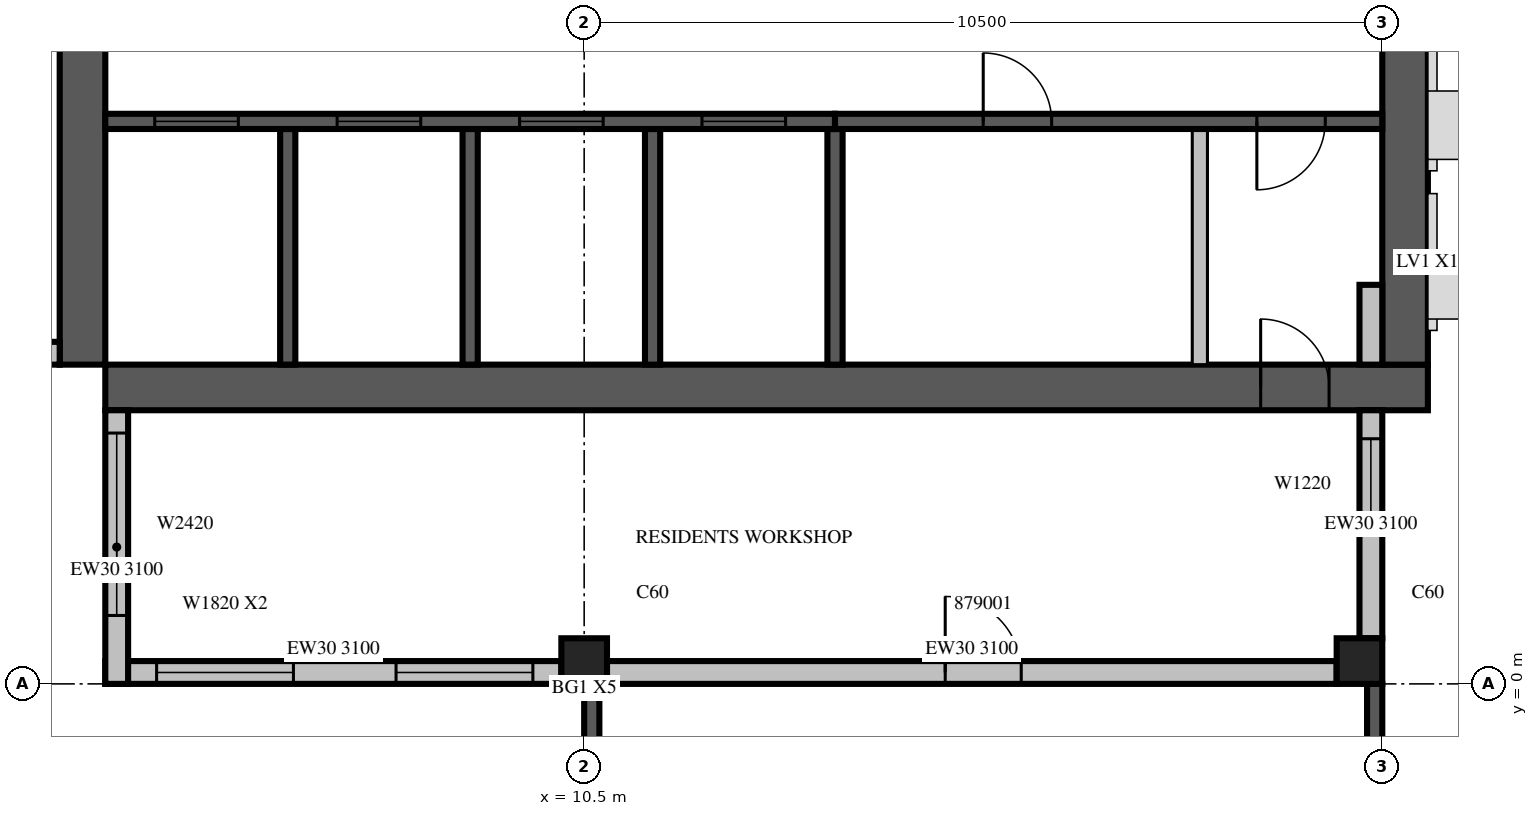
"""IFC4 building model, lengths in metres.
Left out: names, types, materials, properties, quantities, classifications, styles, units other than length and angle.
Written with IfcOpenShell. Run it as: python <this file> out.ifc"""

import sys

from ifc_helpers import new_model, si_unit, direction, frame, frame_2d, origin, origin_2d, place, context, subcontext, project, spatial, rectangle, extrude, source, transform, mapped, element, fill, save


model = new_model("IFC4")
c1 = context("Model", 3, precision=1e-05, world=origin(), true_north=direction((0.0, 1.0)))
c2 = subcontext(c1, "Body", "Model", "MODEL_VIEW")
j1 = project(units=[si_unit("LENGTHUNIT", "METRE"), si_unit("PLANEANGLEUNIT", "RADIAN")], contexts=[c1])
p1 = place(None, origin())
s1 = spatial("IfcSite", under=j1, at=p1, CompositionType="ELEMENT")
p2 = place(p1, origin())
s2 = spatial("IfcBuilding", under=s1, at=p2, CompositionType="ELEMENT")
p3 = place(p2, frame((0.0, 0.0, 337.0)))
s3 = spatial("IfcBuildingStorey", under=s2, at=p3, CompositionType="ELEMENT", Elevation=337.0)
m1 = source(origin(), c2, "Body", "SweptSolid", [
    extrude(rectangle(XDim=0.6, YDim=0.6, at=origin_2d()), origin(), (0.0, 0.0, 1.0), 3.5),
])
for number, where, z_axis, x_axis in (
    (1, (10.5, 0.3, 0.0), (0.0, 0.0, 1.0), (1.0, 0.0, 0.0)),
    (2, (20.7, 0.3, 0.0), (0.0, 0.0, 1.0), (1.0, 0.0, 0.0)),
):
    element("IfcColumn", number, at=place(p3, frame(where, z_axis=z_axis, x_axis=x_axis)), inside=s3, PredefinedType="COLUMN", context=c2, shape_type="MappedRepresentation", body=[
        mapped(m1, transform((0.0, 0.0, 0.0), scale=1.0)),
    ])
m2 = source(origin(), c2, "Body", "SweptSolid", [
    extrude(rectangle(XDim=17.4, YDim=0.6, at=frame_2d((8.7, 0.0))), origin(), (0.0, 0.0, 1.0), 3.5),
])
p4 = place(p3, frame((3.9, 4.2, 0.0), z_axis=(0.0, 0.0, 1.0), x_axis=(0.0, 1.0, 0.0)))
e3 = element("IfcWall", 3, at=p4, inside=s3, PredefinedType="SHEAR", context=c2, shape_type="MappedRepresentation", body=[
    mapped(m2, transform((0.0, 0.0, 0.0), scale=1.0)),
])
m3 = source(origin(), c2, "Body", "SweptSolid", [
    extrude(rectangle(XDim=2.2, YDim=2.1, at=frame_2d((1.1, 1.05))), frame((0.0, 0.31, 0.0), z_axis=(0.0, -1.0, 0.0), x_axis=(1.0, 0.0, 0.0)), (0.0, 0.0, 1.0), 0.62),
])
p5 = place(p4, frame((4.2, 0.0, 0.0)))
e4 = element("IfcOpeningElement", 4, at=p5, cuts=e3, PredefinedType="OPENING", context=c2, shape_type="MappedRepresentation", body=[
    mapped(m3, transform((0.0, 0.0, 0.0), scale=1.0)),
])
p6 = place(p3, frame((4.2, 3.9, 0.0), z_axis=(0.0, 0.0, 1.0), x_axis=(1.0, 0.0, 0.0)))
e5 = element("IfcWall", 5, at=p6, inside=s3, PredefinedType="SHEAR", context=c2, shape_type="MappedRepresentation", body=[
    mapped(m2, transform((0.0, 0.0, 0.0), scale=1.0)),
])
m4 = source(origin(), c2, "Body", "SweptSolid", [
    extrude(rectangle(XDim=0.9, YDim=2.1, at=frame_2d((0.45, 1.05))), frame((0.0, 0.31, 0.0), z_axis=(0.0, -1.0, 0.0), x_axis=(1.0, 0.0, 0.0)), (0.0, 0.0, 1.0), 0.62),
])
p7 = place(p6, frame((15.2, 0.0, 0.0)))
e6 = element("IfcOpeningElement", 6, at=p7, cuts=e5, PredefinedType="OPENING", context=c2, shape_type="MappedRepresentation", body=[
    mapped(m4, transform((0.0, 0.0, 0.0), scale=1.0)),
])
m5 = source(origin(), c2, "Body", "SweptSolid", [
    extrude(rectangle(XDim=16.8, YDim=0.6, at=frame_2d((8.4, 0.0))), origin(), (0.0, 0.0, 1.0), 3.5),
])
p8 = place(p3, frame((21.3, 4.2, 0.0), z_axis=(0.0, 0.0, 1.0), x_axis=(0.0, 1.0, 0.0)))
e7 = element("IfcWall", 7, at=p8, inside=s3, PredefinedType="SHEAR", context=c2, shape_type="MappedRepresentation", body=[
    mapped(m5, transform((0.0, 0.0, 0.0), scale=1.0)),
])
m6 = source(origin(), c2, "Body", "SweptSolid", [
    extrude(rectangle(XDim=1.2, YDim=2.4, at=frame_2d((0.6, 1.2))), frame((0.0, 0.31, 0.0), z_axis=(0.0, -1.0, 0.0), x_axis=(1.0, 0.0, 0.0)), (0.0, 0.0, 1.0), 0.62),
])
p9 = place(p8, frame((12.0, 0.0, 0.6)))
e8 = element("IfcOpeningElement", 8, at=p9, cuts=e7, PredefinedType="OPENING", context=c2, shape_type="MappedRepresentation", body=[
    mapped(m6, transform((0.0, 0.0, 0.0), scale=1.0)),
])
m7 = source(origin(), c2, "Body", "SweptSolid", [
    extrude(rectangle(XDim=3.9, YDim=0.2, at=frame_2d((1.95, 0.0))), origin(), (0.0, 0.0, 1.0), 3.1),
])
p10 = place(p3, frame((10.6, 0.0, 0.0), z_axis=(0.0, 0.0, 1.0), x_axis=(0.0, -1.0, 0.0)))
e9 = element("IfcWall", 9, at=p10, inside=s3, PredefinedType="SOLIDWALL", context=c2, shape_type="MappedRepresentation", body=[
    mapped(m7, transform((0.0, 0.0, 0.0), scale=1.0)),
])
m8 = source(origin(), c2, "Body", "SweptSolid", [
    extrude(rectangle(XDim=2.4, YDim=2.0, at=frame_2d((1.2, 1.0))), frame((0.0, 0.11, 0.0), z_axis=(0.0, -1.0, 0.0), x_axis=(1.0, 0.0, 0.0)), (0.0, 0.0, 1.0), 0.22),
])
p11 = place(p10, frame((0.75, 0.0, 0.6)))
e10 = element("IfcOpeningElement", 10, at=p11, cuts=e9, PredefinedType="OPENING", context=c2, shape_type="MappedRepresentation", body=[
    mapped(m8, transform((0.0, 0.0, 0.0), scale=1.0)),
])
p12 = place(p3, frame((20.9, 0.0, 0.0), z_axis=(0.0, 0.0, 1.0), x_axis=(0.0, -1.0, 0.0)))
e11 = element("IfcWall", 11, at=p12, inside=s3, PredefinedType="SOLIDWALL", context=c2, shape_type="MappedRepresentation", body=[
    mapped(m7, transform((0.0, 0.0, 0.0), scale=1.0)),
])
p13 = place(p12, frame((0.75, 0.0, 0.6)))
e12 = element("IfcOpeningElement", 12, at=p13, cuts=e11, PredefinedType="OPENING", context=c2, shape_type="MappedRepresentation", body=[
    mapped(m8, transform((0.0, 0.0, 0.0), scale=1.0)),
])
m9 = source(origin(), c2, "Body", "SweptSolid", [
    extrude(rectangle(XDim=6.0, YDim=0.3, at=frame_2d((3.0, 0.0))), origin(), (0.0, 0.0, 1.0), 3.1),
])
p14 = place(p3, frame((4.2, 0.15, 0.0), z_axis=(0.0, 0.0, 1.0), x_axis=(1.0, 0.0, 0.0)))
e13 = element("IfcWall", 13, at=p14, inside=s3, PredefinedType="STANDARD", context=c2, shape_type="MappedRepresentation", body=[
    mapped(m9, transform((0.0, 0.0, 0.0), scale=1.0)),
])
m10 = source(origin(), c2, "Body", "SweptSolid", [
    extrude(rectangle(XDim=1.8, YDim=2.0, at=frame_2d((0.9, 1.0))), frame((0.0, 0.16, 0.0), z_axis=(0.0, -1.0, 0.0), x_axis=(1.0, 0.0, 0.0)), (0.0, 0.0, 1.0), 0.32),
])
p15 = place(p14, frame((0.675, 0.0, 0.6)))
e14 = element("IfcOpeningElement", 14, at=p15, cuts=e13, PredefinedType="OPENING", context=c2, shape_type="MappedRepresentation", body=[
    mapped(m10, transform((0.0, 0.0, 0.0), scale=1.0)),
])
p16 = place(p14, frame((3.825, 0.0, 0.6)))
e15 = element("IfcOpeningElement", 15, at=p16, cuts=e13, PredefinedType="OPENING", context=c2, shape_type="MappedRepresentation", body=[
    mapped(m10, transform((0.0, 0.0, 0.0), scale=1.0)),
])
m11 = source(origin(), c2, "Body", "SweptSolid", [
    extrude(rectangle(XDim=9.6, YDim=0.3, at=frame_2d((4.8, 0.0))), origin(), (0.0, 0.0, 1.0), 3.1),
])
p17 = place(p3, frame((10.8, 0.15, 0.0), z_axis=(0.0, 0.0, 1.0), x_axis=(1.0, 0.0, 0.0)))
e16 = element("IfcWall", 16, at=p17, inside=s3, PredefinedType="STANDARD", context=c2, shape_type="MappedRepresentation", body=[
    mapped(m11, transform((0.0, 0.0, 0.0), scale=1.0)),
])
m12 = source(origin(), c2, "Body", "SweptSolid", [
    extrude(rectangle(XDim=1.0, YDim=2.1, at=frame_2d((0.5, 1.05))), frame((0.0, 0.16, 0.0), z_axis=(0.0, -1.0, 0.0), x_axis=(1.0, 0.0, 0.0)), (0.0, 0.0, 1.0), 0.32),
])
p18 = place(p17, frame((4.45, 0.0, 0.0)))
e17 = element("IfcOpeningElement", 17, at=p18, cuts=e16, PredefinedType="OPENING", context=c2, shape_type="MappedRepresentation", body=[
    mapped(m12, transform((0.0, 0.0, 0.0), scale=1.0)),
])
m13 = source(origin(), c2, "Body", "SweptSolid", [
    extrude(rectangle(XDim=3.0, YDim=0.3, at=frame_2d((1.5, 0.0))), origin(), (0.0, 0.0, 1.0), 3.1),
])
p19 = place(p3, frame((20.85, 0.6, 0.0), z_axis=(0.0, 0.0, 1.0), x_axis=(0.0, 1.0, 0.0)))
e18 = element("IfcWall", 18, at=p19, inside=s3, PredefinedType="STANDARD", context=c2, shape_type="MappedRepresentation", body=[
    mapped(m13, transform((0.0, 0.0, 0.0), scale=1.0)),
])
m14 = source(origin(), c2, "Body", "SweptSolid", [
    extrude(rectangle(XDim=1.2, YDim=2.0, at=frame_2d((0.6, 1.0))), frame((0.0, 0.16, 0.0), z_axis=(0.0, -1.0, 0.0), x_axis=(1.0, 0.0, 0.0)), (0.0, 0.0, 1.0), 0.32),
])
p20 = place(p19, frame((1.425, 0.0, 0.6)))
e19 = element("IfcOpeningElement", 19, at=p20, cuts=e18, PredefinedType="OPENING", context=c2, shape_type="MappedRepresentation", body=[
    mapped(m14, transform((0.0, 0.0, 0.0), scale=1.0)),
])
m15 = source(origin(), c2, "Body", "SweptSolid", [
    extrude(rectangle(XDim=1.05, YDim=0.3, at=frame_2d((0.525, 0.0))), origin(), (0.0, 0.0, 1.0), 3.1),
])
p21 = place(p3, frame((20.85, 4.2, 0.0), z_axis=(0.0, 0.0, 1.0), x_axis=(0.0, 1.0, 0.0)))
e20 = element("IfcWall", 20, at=p21, inside=s3, PredefinedType="STANDARD", context=c2, shape_type="MappedRepresentation", body=[
    mapped(m15, transform((0.0, 0.0, 0.0), scale=1.0)),
])
m16 = source(origin(), c2, "Body", "SweptSolid", [
    extrude(rectangle(XDim=3.6, YDim=0.3, at=frame_2d((1.8, 0.0))), origin(), (0.0, 0.0, 1.0), 3.1),
])
p22 = place(p3, frame((0.0, 4.35, 0.0), z_axis=(0.0, 0.0, 1.0), x_axis=(1.0, 0.0, 0.0)))
e21 = element("IfcWall", 21, at=p22, inside=s3, PredefinedType="STANDARD", context=c2, shape_type="MappedRepresentation", body=[
    mapped(m16, transform((0.0, 0.0, 0.0), scale=1.0)),
])
m17 = source(origin(), c2, "Body", "SweptSolid", [
    extrude(rectangle(XDim=2.4, YDim=2.0, at=frame_2d((1.2, 1.0))), frame((0.0, 0.16, 0.0), z_axis=(0.0, -1.0, 0.0), x_axis=(1.0, 0.0, 0.0)), (0.0, 0.0, 1.0), 0.32),
])
p23 = place(p22, frame((0.9, 0.0, 0.6)))
e22 = element("IfcOpeningElement", 22, at=p23, cuts=e21, PredefinedType="OPENING", context=c2, shape_type="MappedRepresentation", body=[
    mapped(m17, transform((0.0, 0.0, 0.0), scale=1.0)),
])
p24 = place(p3, frame((4.35, 3.6, 0.0), z_axis=(0.0, 0.0, 1.0), x_axis=(0.0, -1.0, 0.0)))
e23 = element("IfcWall", 23, at=p24, inside=s3, PredefinedType="STANDARD", context=c2, shape_type="MappedRepresentation", body=[
    mapped(m16, transform((0.0, 0.0, 0.0), scale=1.0)),
])
p25 = place(p24, frame((0.3, 0.0, 0.6)))
e24 = element("IfcOpeningElement", 24, at=p25, cuts=e23, PredefinedType="OPENING", context=c2, shape_type="MappedRepresentation", body=[
    mapped(m17, transform((0.0, 0.0, 0.0), scale=1.0)),
])
m18 = source(origin(), c2, "Body", "SweptSolid", [
    extrude(rectangle(XDim=3.1, YDim=0.2, at=frame_2d((1.55, 0.0))), origin(), (0.0, 0.0, 1.0), 3.5),
])
for number, where, z_axis, x_axis in (
    (25, (6.6, 4.2, 0.0), (0.0, 0.0, 1.0), (0.0, 1.0, 0.0)),
    (26, (9.0, 4.2, 0.0), (0.0, 0.0, 1.0), (0.0, 1.0, 0.0)),
    (27, (11.4, 4.2, 0.0), (0.0, 0.0, 1.0), (0.0, 1.0, 0.0)),
):
    element("IfcWall", number, at=place(p3, frame(where, z_axis=z_axis, x_axis=x_axis)), inside=s3, PredefinedType="SOLIDWALL", context=c2, shape_type="MappedRepresentation", body=[
        mapped(m18, transform((0.0, 0.0, 0.0), scale=1.0)),
    ])
m19 = source(origin(), c2, "Body", "SweptSolid", [
    extrude(rectangle(XDim=3.1, YDim=0.2, at=frame_2d((1.55, 0.0))), origin(), (0.0, 0.0, 1.0), 3.1),
])
p26 = place(p3, frame((13.8, 4.2, 0.0), z_axis=(0.0, 0.0, 1.0), x_axis=(0.0, 1.0, 0.0)))
e28 = element("IfcWall", 28, at=p26, inside=s3, PredefinedType="SOLIDWALL", context=c2, shape_type="MappedRepresentation", body=[
    mapped(m19, transform((0.0, 0.0, 0.0), scale=1.0)),
])
m20 = source(origin(), c2, "Body", "SweptSolid", [
    extrude(rectangle(XDim=3.1, YDim=0.2, at=frame_2d((1.55, 0.0))), origin(), (0.0, 0.0, 1.0), 3.1),
])
p27 = place(p3, frame((18.6, 4.2, 0.0), z_axis=(0.0, 0.0, 1.0), x_axis=(0.0, 1.0, 0.0)))
e29 = element("IfcWall", 29, at=p27, inside=s3, PredefinedType="PARTITIONING", context=c2, shape_type="MappedRepresentation", body=[
    mapped(m20, transform((0.0, 0.0, 0.0), scale=1.0)),
])
m21 = source(origin(), c2, "Body", "SweptSolid", [
    extrude(rectangle(XDim=9.6, YDim=0.2, at=frame_2d((4.8, 0.0))), origin(), (0.0, 0.0, 1.0), 3.5),
])
p28 = place(p3, frame((4.2, 7.4, 0.0), z_axis=(0.0, 0.0, 1.0), x_axis=(1.0, 0.0, 0.0)))
e30 = element("IfcWall", 30, at=p28, inside=s3, PredefinedType="SOLIDWALL", context=c2, shape_type="MappedRepresentation", body=[
    mapped(m21, transform((0.0, 0.0, 0.0), scale=1.0)),
])
m22 = source(origin(), c2, "Body", "SweptSolid", [
    extrude(rectangle(XDim=1.1, YDim=2.1, at=frame_2d((0.55, 1.05))), frame((0.0, 0.11, 0.0), z_axis=(0.0, -1.0, 0.0), x_axis=(1.0, 0.0, 0.0)), (0.0, 0.0, 1.0), 0.22),
])
p29 = place(p28, frame((0.65, 0.0, 0.0)))
e31 = element("IfcOpeningElement", 31, at=p29, cuts=e30, PredefinedType="OPENING", context=c2, shape_type="MappedRepresentation", body=[
    mapped(m22, transform((0.0, 0.0, 0.0), scale=1.0)),
])
p30 = place(p28, frame((3.05, 0.0, 0.0)))
e32 = element("IfcOpeningElement", 32, at=p30, cuts=e30, PredefinedType="OPENING", context=c2, shape_type="MappedRepresentation", body=[
    mapped(m22, transform((0.0, 0.0, 0.0), scale=1.0)),
])
p31 = place(p28, frame((5.45, 0.0, 0.0)))
e33 = element("IfcOpeningElement", 33, at=p31, cuts=e30, PredefinedType="OPENING", context=c2, shape_type="MappedRepresentation", body=[
    mapped(m22, transform((0.0, 0.0, 0.0), scale=1.0)),
])
p32 = place(p28, frame((7.85, 0.0, 0.0)))
e34 = element("IfcOpeningElement", 34, at=p32, cuts=e30, PredefinedType="OPENING", context=c2, shape_type="MappedRepresentation", body=[
    mapped(m22, transform((0.0, 0.0, 0.0), scale=1.0)),
])
m23 = source(origin(), c2, "Body", "SweptSolid", [
    extrude(rectangle(XDim=7.2, YDim=0.2, at=frame_2d((3.6, 0.0))), origin(), (0.0, 0.0, 1.0), 3.1),
])
p33 = place(p3, frame((13.8, 7.4, 0.0), z_axis=(0.0, 0.0, 1.0), x_axis=(1.0, 0.0, 0.0)))
e35 = element("IfcWall", 35, at=p33, inside=s3, PredefinedType="SOLIDWALL", context=c2, shape_type="MappedRepresentation", body=[
    mapped(m23, transform((0.0, 0.0, 0.0), scale=1.0)),
])
m24 = source(origin(), c2, "Body", "SweptSolid", [
    extrude(rectangle(XDim=0.9, YDim=2.1, at=frame_2d((0.45, 1.05))), frame((0.0, 0.11, 0.0), z_axis=(0.0, -1.0, 0.0), x_axis=(1.0, 0.0, 0.0)), (0.0, 0.0, 1.0), 0.22),
])
p34 = place(p33, frame((1.95, 0.0, 0.0)))
e36 = element("IfcOpeningElement", 36, at=p34, cuts=e35, PredefinedType="OPENING", context=c2, shape_type="MappedRepresentation", body=[
    mapped(m24, transform((0.0, 0.0, 0.0), scale=1.0)),
])
p35 = place(p33, frame((5.55, 0.0, 0.0)))
e37 = element("IfcOpeningElement", 37, at=p35, cuts=e35, PredefinedType="OPENING", context=c2, shape_type="MappedRepresentation", body=[
    mapped(m24, transform((0.0, 0.0, 0.0), scale=1.0)),
])
m25 = source(origin(), c2, "Body", "SweptSolid", [
    extrude(rectangle(XDim=1.8, YDim=2.0, at=frame_2d((0.9, 1.0))), frame((0.0, 0.03, 0.0), z_axis=(0.0, -1.0, 0.0), x_axis=(1.0, 0.0, 0.0)), (0.0, 0.0, 1.0), 0.06),
])
p36 = place(p15, origin())
e38 = element("IfcWindow", 38, at=p36, inside=s3, PartitioningType="SINGLE_PANEL", PredefinedType="WINDOW", context=c2, shape_type="MappedRepresentation", body=[
    mapped(m25, transform((0.0, 0.0, 0.0), scale=1.0)),
])
fill(e14, e38)
p37 = place(p16, origin())
e39 = element("IfcWindow", 39, at=p37, inside=s3, PartitioningType="SINGLE_PANEL", PredefinedType="WINDOW", context=c2, shape_type="MappedRepresentation", body=[
    mapped(m25, transform((0.0, 0.0, 0.0), scale=1.0)),
])
fill(e15, e39)
m26 = source(origin(), c2, "Body", "SweptSolid", [
    extrude(rectangle(XDim=1.2, YDim=2.0, at=frame_2d((0.6, 1.0))), frame((0.0, 0.03, 0.0), z_axis=(0.0, -1.0, 0.0), x_axis=(1.0, 0.0, 0.0)), (0.0, 0.0, 1.0), 0.06),
])
p38 = place(p20, origin())
e40 = element("IfcWindow", 40, at=p38, inside=s3, PartitioningType="SINGLE_PANEL", PredefinedType="WINDOW", context=c2, shape_type="MappedRepresentation", body=[
    mapped(m26, transform((0.0, 0.0, 0.0), scale=1.0)),
])
fill(e19, e40)
m27 = source(origin(), c2, "Body", "SweptSolid", [
    extrude(rectangle(XDim=2.4, YDim=2.0, at=frame_2d((1.2, 1.0))), frame((0.0, 0.03, 0.0), z_axis=(0.0, -1.0, 0.0), x_axis=(1.0, 0.0, 0.0)), (0.0, 0.0, 1.0), 0.06),
])
p39 = place(p25, origin())
e41 = element("IfcWindow", 41, at=p39, inside=s3, PartitioningType="SINGLE_PANEL", PredefinedType="WINDOW", context=c2, shape_type="MappedRepresentation", body=[
    mapped(m27, transform((0.0, 0.0, 0.0), scale=1.0)),
])
fill(e24, e41)
m28 = source(origin(), c2, "Body", "SweptSolid", [
    extrude(rectangle(XDim=1.1, YDim=2.1, at=frame_2d((0.55, 1.05))), frame((0.0, 0.025, 0.0), z_axis=(0.0, -1.0, 0.0), x_axis=(1.0, 0.0, 0.0)), (0.0, 0.0, 1.0), 0.05),
])
p40 = place(p29, origin())
e42 = element("IfcDoor", 42, at=p40, inside=s3, OperationType="SLIDING_TO_LEFT", PredefinedType="DOOR", context=c2, shape_type="MappedRepresentation", body=[
    mapped(m28, transform((0.0, 0.0, 0.0), scale=1.0)),
])
fill(e31, e42)
p41 = place(p30, origin())
e43 = element("IfcDoor", 43, at=p41, inside=s3, OperationType="SLIDING_TO_LEFT", PredefinedType="DOOR", context=c2, shape_type="MappedRepresentation", body=[
    mapped(m28, transform((0.0, 0.0, 0.0), scale=1.0)),
])
fill(e32, e43)
p42 = place(p31, origin())
e44 = element("IfcDoor", 44, at=p42, inside=s3, OperationType="SLIDING_TO_LEFT", PredefinedType="DOOR", context=c2, shape_type="MappedRepresentation", body=[
    mapped(m28, transform((0.0, 0.0, 0.0), scale=1.0)),
])
fill(e33, e44)
p43 = place(p32, origin())
e45 = element("IfcDoor", 45, at=p43, inside=s3, OperationType="SLIDING_TO_LEFT", PredefinedType="DOOR", context=c2, shape_type="MappedRepresentation", body=[
    mapped(m28, transform((0.0, 0.0, 0.0), scale=1.0)),
])
fill(e34, e45)
m29 = source(origin(), c2, "Body", "SweptSolid", [
    extrude(rectangle(XDim=0.9, YDim=2.1, at=frame_2d((0.45, 1.05))), frame((0.0, 0.025, 0.0), z_axis=(0.0, -1.0, 0.0), x_axis=(1.0, 0.0, 0.0)), (0.0, 0.0, 1.0), 0.05),
])
p44 = place(p34, origin())
e46 = element("IfcDoor", 46, at=p44, inside=s3, OperationType="SINGLE_SWING_LEFT", PredefinedType="DOOR", context=c2, shape_type="MappedRepresentation", body=[
    mapped(m29, transform((0.0, 0.0, 0.0), scale=1.0)),
])
fill(e36, e46)
p45 = place(p35, origin())
e47 = element("IfcDoor", 47, at=p45, inside=s3, OperationType="SINGLE_SWING_RIGHT", PredefinedType="DOOR", context=c2, shape_type="MappedRepresentation", body=[
    mapped(m29, transform((0.0, 0.0, 0.0), scale=1.0)),
])
fill(e37, e47)
p46 = place(p7, origin())
e48 = element("IfcDoor", 48, at=p46, inside=s3, OperationType="SINGLE_SWING_LEFT", PredefinedType="DOOR", context=c2, shape_type="MappedRepresentation", body=[
    mapped(m29, transform((0.0, 0.0, 0.0), scale=1.0)),
])
fill(e6, e48)
m30 = source(origin(), c2, "Body", "SweptSolid", [
    extrude(rectangle(XDim=1.0, YDim=2.1, at=frame_2d((0.5, 1.05))), frame((0.0, 0.025, 0.0), z_axis=(0.0, -1.0, 0.0), x_axis=(1.0, 0.0, 0.0)), (0.0, 0.0, 1.0), 0.05),
])
p47 = place(p18, origin())
e49 = element("IfcDoor", 49, at=p47, inside=s3, OperationType="SINGLE_SWING_LEFT", PredefinedType="DOOR", context=c2, shape_type="MappedRepresentation", body=[
    mapped(m30, transform((0.0, 0.0, 0.0), scale=1.0)),
])
fill(e17, e49)
save(model, sys.argv[1])
